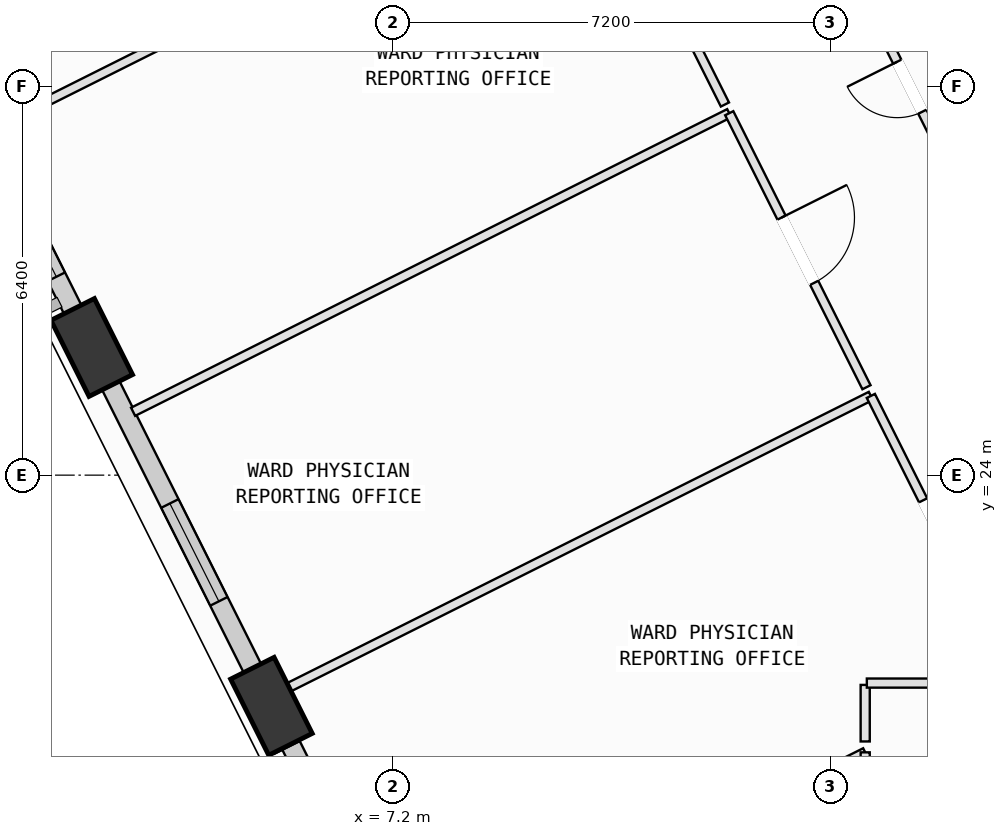
"""IFC4 building model, lengths in metres.
Left out: names, types, materials, properties, quantities, classifications, styles, units other than length and angle.
Written with IfcOpenShell. Run it as: python <this file> out.ifc"""

import sys

from ifc_helpers import new_model, si_unit, direction, frame, frame_2d, origin, origin_2d, place, context, subcontext, project, spatial, rectangle, extrude, element, fill, save


model = new_model("IFC4")
c1 = context("Model", 3, precision=1e-05, world=origin(), true_north=direction((0.0, 1.0)))
c2 = subcontext(c1, "Body", "Model", "MODEL_VIEW")
j1 = project(units=[si_unit("LENGTHUNIT", "METRE"), si_unit("PLANEANGLEUNIT", "RADIAN")], contexts=[c1])
p1 = place(None, origin())
s1 = spatial("IfcSite", under=j1, at=p1, CompositionType="ELEMENT")
p2 = place(p1, origin())
s2 = spatial("IfcBuilding", under=s1, at=p2, CompositionType="ELEMENT")
p3 = place(p2, frame((0.0, 0.0, 136.4)))
s3 = spatial("IfcBuildingStorey", under=s2, at=p3, CompositionType="ELEMENT", Elevation=136.4)
p4 = place(p3, frame((2.25, 26.1, 0.002), z_axis=(-0.004301232882, -0.128915824962, 0.991646211847), x_axis=(-0.417942591827, 0.901122566633, 0.115334772911)))
e1 = element("IfcColumn", 1, at=p4, inside=s3, PredefinedType="COLUMN", context=c2, shape_type="SweptSolid", body=[
    extrude(rectangle(XDim=1.4, YDim=0.8, at=origin_2d()), origin(), (0.0, 0.0, 1.0), 4.03),
])
p5 = place(p3, frame((5.205, 20.198, 0.002), z_axis=(0.019896938328, -0.116712528487, 0.992966413097), x_axis=(-0.590599930302, 0.799990252323, 0.105864623533)))
e2 = element("IfcColumn", 2, at=p5, inside=s3, PredefinedType="COLUMN", context=c2, shape_type="SweptSolid", body=[
    extrude(rectangle(XDim=1.4, YDim=0.8, at=origin_2d()), origin(), (0.0, 0.0, 1.0), 4.025),
])
p6 = place(p3, frame((2.137, 26.325, 0.0), z_axis=(0.0, 0.0, 1.0), x_axis=(-0.447714715176, 0.894176455637, 0.0)))
e3 = element("IfcWall", 3, at=p6, inside=s3, PredefinedType="SOLIDWALL", context=c2, shape_type="SweptSolid", body=[
    extrude(rectangle(XDim=5.456, YDim=0.32, at=frame_2d((2.728, 0.0))), origin(), (0.0, 0.0, 1.0), 3.165),
])
p7 = place(p6, frame((1.048, 0.0, 0.75)))
e4 = element("IfcOpeningElement", 4, at=p7, cuts=e3, PredefinedType="OPENING", context=c2, shape_type="SweptSolid", body=[
    extrude(rectangle(XDim=1.4, YDim=1.85, at=frame_2d((0.7, 0.925))), frame((0.0, 0.17, 0.0), z_axis=(0.0, -1.0, 0.0), x_axis=(1.0, 0.0, 0.0)), (0.0, 0.0, 1.0), 0.34),
])
p8 = place(p3, frame((5.087, 20.434, 0.0), z_axis=(0.0, 0.0, 1.0), x_axis=(-0.447768773835, 0.894149386388, 0.0)))
e5 = element("IfcWall", 5, at=p8, inside=s3, PredefinedType="SOLIDWALL", context=c2, shape_type="SweptSolid", body=[
    extrude(rectangle(XDim=5.628, YDim=0.32, at=frame_2d((2.814, 0.0))), origin(), (0.0, 0.0, 1.0), 3.165),
])
p9 = place(p8, frame((1.667, 0.0, 0.75)))
e6 = element("IfcOpeningElement", 6, at=p9, cuts=e5, PredefinedType="OPENING", context=c2, shape_type="SweptSolid", body=[
    extrude(rectangle(XDim=1.8, YDim=2.05, at=frame_2d((0.9, 1.025))), frame((0.0, 0.17, 0.0), z_axis=(0.0, -1.0, 0.0), x_axis=(1.0, 0.0, 0.0)), (0.0, 0.0, 1.0), 0.34),
])
p10 = place(p3, frame((8.062, 14.492, 0.0), z_axis=(0.0, 0.0, 1.0), x_axis=(-0.447765402244, 0.894151074793, 0.0)))
e7 = element("IfcWall", 7, at=p10, inside=s3, PredefinedType="SOLIDWALL", context=c2, shape_type="SweptSolid", body=[
    extrude(rectangle(XDim=5.662, YDim=0.32, at=frame_2d((2.831, 0.0))), origin(), (0.0, 0.0, 1.0), 3.165),
])
p11 = place(p10, frame((3.081, 0.0, 0.75)))
e8 = element("IfcOpeningElement", 8, at=p11, cuts=e7, PredefinedType="OPENING", context=c2, shape_type="SweptSolid", body=[
    extrude(rectangle(XDim=1.2, YDim=1.75, at=frame_2d((0.6, 0.875))), frame((0.0, 0.17, 0.0), z_axis=(0.0, -1.0, 0.0), x_axis=(1.0, 0.0, 0.0)), (0.0, 0.0, 1.0), 0.34),
])
p12 = place(p3, frame((7.587, 15.744, 0.0), z_axis=(0.0, 0.0, 1.0), x_axis=(0.894160922131, 0.447745737371, 0.0)))
e9 = element("IfcWall", 9, at=p12, inside=s3, PredefinedType="PARTITIONING", context=c2, shape_type="SweptSolid", body=[
    extrude(rectangle(XDim=8.257, YDim=0.15, at=frame_2d((4.128, 0.0))), origin(), (0.0, 0.0, 1.0), 3.78),
])
p13 = place(p12, frame((3.529, 0.0, 0.0)))
e10 = element("IfcOpeningElement", 10, at=p13, cuts=e9, PredefinedType="OPENING", context=c2, shape_type="SweptSolid", body=[
    extrude(rectangle(XDim=1.2, YDim=2.15, at=frame_2d((0.6, 1.075))), frame((0.0, 0.085, 0.0), z_axis=(0.0, -1.0, 0.0), x_axis=(1.0, 0.0, 0.0)), (0.0, 0.0, 1.0), 0.17),
])
p14 = place(p3, frame((14.97, 19.441, 0.0), z_axis=(0.0, 0.0, 1.0), x_axis=(0.0, -1.0, 0.0)))
e11 = element("IfcWall", 11, at=p14, inside=s3, PredefinedType="PARTITIONING", context=c2, shape_type="SweptSolid", body=[
    extrude(rectangle(XDim=1.211, YDim=0.15, at=frame_2d((0.605, 0.0))), origin(), (0.0, 0.0, 1.0), 2.965),
])
p15 = place(p3, frame((14.97, 20.55, 0.0), z_axis=(0.0, 0.0, 1.0), x_axis=(0.0, -1.0, 0.0)))
e12 = element("IfcWall", 12, at=p15, inside=s3, PredefinedType="PARTITIONING", context=c2, shape_type="SweptSolid", body=[
    extrude(rectangle(XDim=0.93, YDim=0.15, at=frame_2d((0.465, 0.0))), origin(), (0.0, 0.0, 1.0), 2.965),
])
p16 = place(p3, frame((5.321, 19.452, 0.0), z_axis=(0.0, 0.0, 1.0), x_axis=(-0.447325844386, 0.894371057752, 0.0)))
e13 = element("IfcWall", 13, at=p16, inside=s3, PredefinedType="PARTITIONING", context=c2, shape_type="SweptSolid", body=[
    extrude(rectangle(XDim=0.87, YDim=0.15, at=frame_2d((0.435, 0.0))), origin(), (0.0, 0.0, 1.0), 3.165),
])
p17 = place(p3, frame((5.203, 20.366, 0.0), z_axis=(0.0, 0.0, 1.0), x_axis=(0.894174650725, 0.447718319929, 0.0)))
e14 = element("IfcWall", 14, at=p17, inside=s3, PredefinedType="PARTITIONING", context=c2, shape_type="SweptSolid", body=[
    extrude(rectangle(XDim=11.027, YDim=0.15, at=frame_2d((5.514, 0.0))), origin(), (0.0, 0.0, 1.0), 3.78),
])
p18 = place(p3, frame((15.063, 25.303, 0.0), z_axis=(0.0, 0.0, 1.0), x_axis=(0.447620432857, -0.894223656637, 0.0)))
e15 = element("IfcWall", 15, at=p18, inside=s3, PredefinedType="PARTITIONING", context=c2, shape_type="SweptSolid", body=[
    extrude(rectangle(XDim=5.04, YDim=0.15, at=frame_2d((2.52, 0.0))), origin(), (0.0, 0.0, 1.0), 3.78),
])
p19 = place(p18, frame((1.92, 0.0, 0.0)))
e16 = element("IfcOpeningElement", 16, at=p19, cuts=e15, PredefinedType="OPENING", context=c2, shape_type="SweptSolid", body=[
    extrude(rectangle(XDim=1.2, YDim=2.15, at=frame_2d((0.6, 1.075))), frame((0.0, 0.085, 0.0), z_axis=(0.0, -1.0, 0.0), x_axis=(1.0, 0.0, 0.0)), (0.0, 0.0, 1.0), 0.17),
])
p20 = place(p3, frame((16.887, 20.58, 0.0), z_axis=(0.0, 0.0, 1.0), x_axis=(-1.0, 0.0, 0.0)))
e17 = element("IfcWall", 17, at=p20, inside=s3, PredefinedType="PARTITIONING", context=c2, shape_type="SweptSolid", body=[
    extrude(rectangle(XDim=1.89, YDim=0.15, at=frame_2d((0.945, 0.0))), origin(), (0.0, 0.0, 1.0), 3.78),
])
p21 = place(p3, frame((2.93, 25.042, 0.0), z_axis=(0.0, 0.0, 1.0), x_axis=(0.894101883429, 0.447863619921, 0.0)))
e18 = element("IfcWall", 18, at=p21, inside=s3, PredefinedType="PARTITIONING", context=c2, shape_type="SweptSolid", body=[
    extrude(rectangle(XDim=10.965, YDim=0.15, at=frame_2d((5.482, 0.0))), origin(), (0.0, 0.0, 1.0), 3.78),
])
p22 = place(p3, frame((12.734, 29.953, 0.0), z_axis=(0.0, 0.0, 1.0), x_axis=(0.447794738158, -0.894136383601, 0.0)))
e19 = element("IfcWall", 19, at=p22, inside=s3, PredefinedType="PARTITIONING", context=c2, shape_type="SweptSolid", body=[
    extrude(rectangle(XDim=5.041, YDim=0.15, at=frame_2d((2.52, 0.0))), origin(), (0.0, 0.0, 1.0), 3.78),
])
p23 = place(p22, frame((1.92, 0.0, 0.0)))
e20 = element("IfcOpeningElement", 20, at=p23, cuts=e19, PredefinedType="OPENING", context=c2, shape_type="SweptSolid", body=[
    extrude(rectangle(XDim=1.2, YDim=2.15, at=frame_2d((0.6, 1.075))), frame((0.0, 0.085, 0.0), z_axis=(0.0, -1.0, 0.0), x_axis=(1.0, 0.0, 0.0)), (0.0, 0.0, 1.0), 0.17),
])
p24 = place(p3, frame((0.602, 29.693, 0.0), z_axis=(0.0, 0.0, 1.0), x_axis=(0.894173203887, 0.447721209516, 0.0)))
e21 = element("IfcWall", 21, at=p24, inside=s3, PredefinedType="PARTITIONING", context=c2, shape_type="SweptSolid", body=[
    extrude(rectangle(XDim=10.964, YDim=0.15, at=frame_2d((5.482, 0.0))), origin(), (0.0, 0.0, 1.0), 3.78),
])
p25 = place(p3, frame((10.406, 34.602, 0.0), z_axis=(0.0, 0.0, 1.0), x_axis=(0.447852925086, -0.894107240488, 0.0)))
e22 = element("IfcWall", 22, at=p25, inside=s3, PredefinedType="PARTITIONING", context=c2, shape_type="SweptSolid", body=[
    extrude(rectangle(XDim=5.04, YDim=0.15, at=frame_2d((2.52, 0.0))), origin(), (0.0, 0.0, 1.0), 3.78),
])
p26 = place(p25, frame((1.92, 0.0, 0.0)))
e23 = element("IfcOpeningElement", 23, at=p26, cuts=e22, PredefinedType="OPENING", context=c2, shape_type="SweptSolid", body=[
    extrude(rectangle(XDim=1.2, YDim=2.15, at=frame_2d((0.6, 1.075))), frame((0.0, 0.085, 0.0), z_axis=(0.0, -1.0, 0.0), x_axis=(1.0, 0.0, 0.0)), (0.0, 0.0, 1.0), 0.17),
])
p27 = place(p3, frame((2.362, 25.363, 0.0), z_axis=(0.0, 0.0, 1.0), x_axis=(-0.448635657036, 0.89371474601, 0.0)))
e24 = element("IfcWall", 24, at=p27, inside=s3, PredefinedType="PARTITIONING", context=c2, shape_type="SweptSolid", body=[
    extrude(rectangle(XDim=0.961, YDim=0.15, at=frame_2d((0.48, 0.0))), origin(), (0.0, 0.0, 1.0), 3.165),
])
p28 = place(p3, frame((17.571, 26.66, 0.0), z_axis=(0.0, 0.0, 1.0), x_axis=(-0.447845777943, 0.894110820412, 0.0)))
e25 = element("IfcWall", 25, at=p28, inside=s3, PredefinedType="PARTITIONING", context=c2, shape_type="SweptSolid", body=[
    extrude(rectangle(XDim=8.34, YDim=0.15, at=frame_2d((4.17, 0.0))), origin(), (0.0, 0.0, 1.0), 3.78),
])
p29 = place(p28, frame((3.71, 0.0, 0.0)))
e26 = element("IfcOpeningElement", 26, at=p29, cuts=e25, PredefinedType="OPENING", context=c2, shape_type="SweptSolid", body=[
    extrude(rectangle(XDim=0.92, YDim=2.1, at=frame_2d((0.46, 1.05))), frame((0.0, 0.085, 0.0), z_axis=(0.0, -1.0, 0.0), x_axis=(1.0, 0.0, 0.0)), (0.0, 0.0, 1.0), 0.17),
])
p30 = place(p7, origin())
e27 = element("IfcWindow", 27, at=p30, inside=s3, PartitioningType="SINGLE_PANEL", PredefinedType="WINDOW", context=c2, shape_type="SweptSolid", body=[
    extrude(rectangle(XDim=1.4, YDim=1.85, at=frame_2d((0.7, 0.925))), frame((0.0, 0.03, 0.0), z_axis=(0.0, -1.0, 0.0), x_axis=(1.0, 0.0, 0.0)), (0.0, 0.0, 1.0), 0.06),
])
fill(e4, e27)
p31 = place(p9, origin())
e28 = element("IfcWindow", 28, at=p31, inside=s3, PartitioningType="SINGLE_PANEL", PredefinedType="WINDOW", context=c2, shape_type="SweptSolid", body=[
    extrude(rectangle(XDim=1.8, YDim=2.05, at=frame_2d((0.9, 1.025))), frame((0.0, 0.03, 0.0), z_axis=(0.0, -1.0, 0.0), x_axis=(1.0, 0.0, 0.0)), (0.0, 0.0, 1.0), 0.06),
])
fill(e6, e28)
p32 = place(p19, origin())
e29 = element("IfcDoor", 29, at=p32, inside=s3, OperationType="SINGLE_SWING_RIGHT", PredefinedType="DOOR", context=c2, shape_type="SweptSolid", body=[
    extrude(rectangle(XDim=1.2, YDim=2.15, at=frame_2d((0.6, 1.075))), frame((0.0, 0.025, 0.0), z_axis=(0.0, -1.0, 0.0), x_axis=(1.0, 0.0, 0.0)), (0.0, 0.0, 1.0), 0.05),
])
fill(e16, e29)
p33 = place(p23, origin())
e30 = element("IfcDoor", 30, at=p33, inside=s3, OperationType="SINGLE_SWING_LEFT", PredefinedType="DOOR", context=c2, shape_type="SweptSolid", body=[
    extrude(rectangle(XDim=1.2, YDim=2.15, at=frame_2d((0.6, 1.075))), frame((0.0, 0.025, 0.0), z_axis=(0.0, -1.0, 0.0), x_axis=(1.0, 0.0, 0.0)), (0.0, 0.0, 1.0), 0.05),
])
fill(e20, e30)
p34 = place(p29, origin())
e31 = element("IfcDoor", 31, at=p34, inside=s3, OperationType="SINGLE_SWING_RIGHT", PredefinedType="DOOR", context=c2, shape_type="SweptSolid", body=[
    extrude(rectangle(XDim=0.92, YDim=2.1, at=frame_2d((0.46, 1.05))), frame((0.0, 0.025, 0.0), z_axis=(0.0, -1.0, 0.0), x_axis=(1.0, 0.0, 0.0)), (0.0, 0.0, 1.0), 0.05),
])
fill(e26, e31)
save(model, sys.argv[1])
